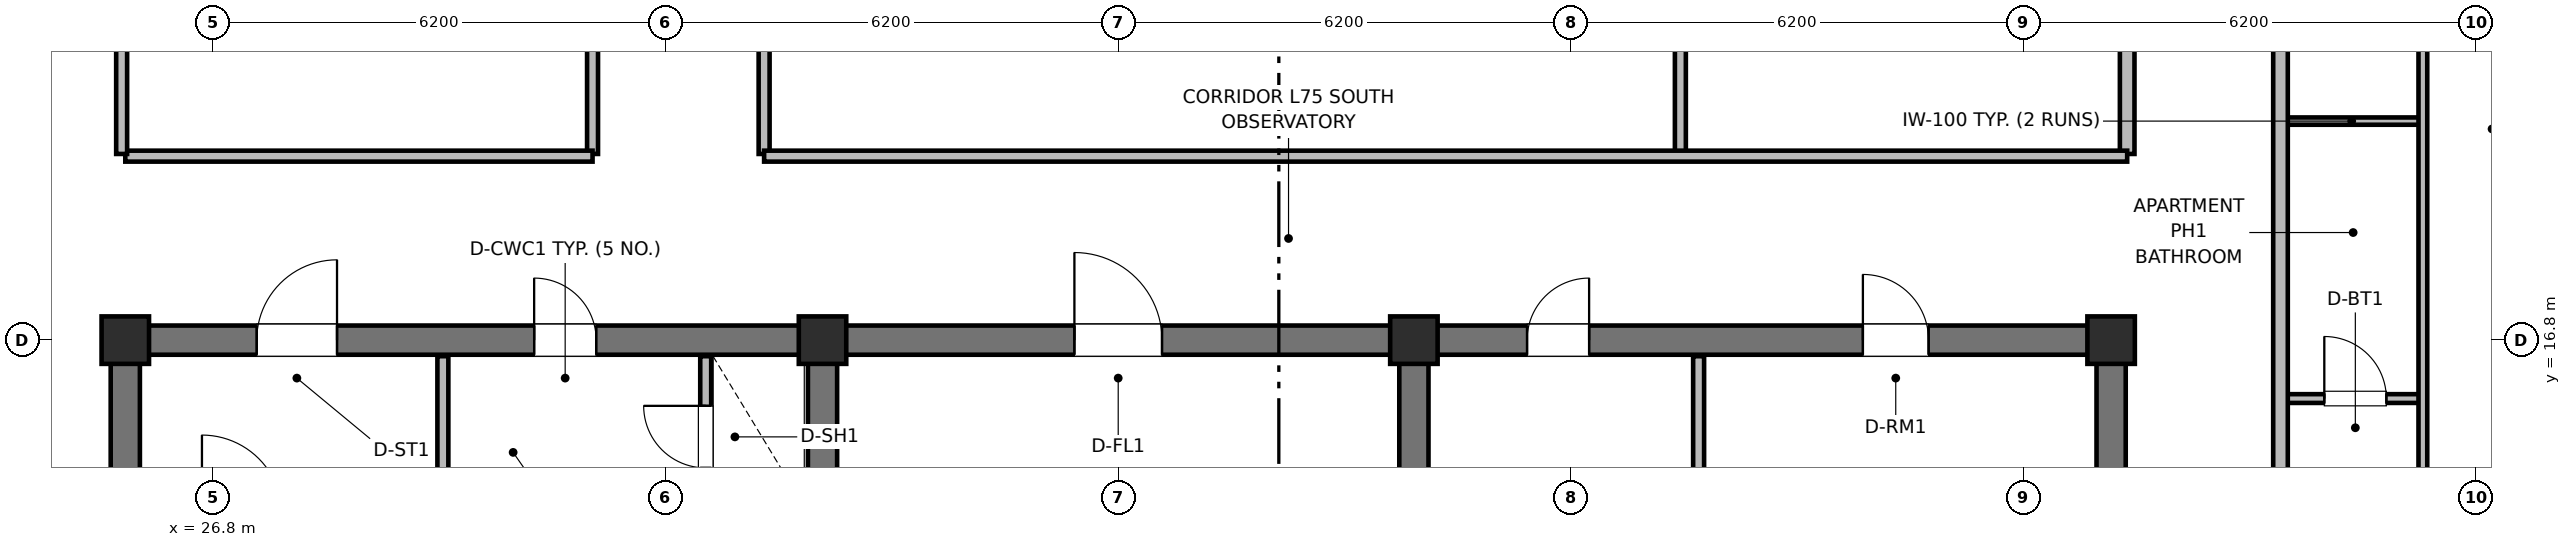
"""IFC4 building model, lengths in metres.
Left out: names, types, materials, properties, quantities, classifications, styles, units other than length and angle.
Written with IfcOpenShell. Run it as: python <this file> out.ifc"""

import sys

from ifc_helpers import new_model, si_unit, direction, frame, frame_2d, origin, origin_2d, place, context, subcontext, project, spatial, rectangle, extrude, element, fill, save


model = new_model("IFC4")
c1 = context("Model", 3, precision=1e-05, world=origin(), true_north=direction((0.0, 1.0)))
c2 = subcontext(c1, "Body", "Model", "MODEL_VIEW")
j1 = project(units=[si_unit("LENGTHUNIT", "METRE"), si_unit("PLANEANGLEUNIT", "RADIAN")], contexts=[c1])
p1 = place(None, origin())
s1 = spatial("IfcSite", under=j1, at=p1, CompositionType="ELEMENT")
p2 = place(p1, origin())
s2 = spatial("IfcBuilding", under=s1, at=p2, CompositionType="ELEMENT")
p3 = place(p2, frame((0.0, 0.0, 297.2)))
s3 = spatial("IfcBuildingStorey", under=s2, at=p3, CompositionType="ELEMENT", Elevation=297.2)
for number, where, z_axis, x_axis in (
    (1, (25.6, 10.8, 0.0), (0.0, 0.0, 1.0), (0.0, 1.0, 0.0)),
    (2, (52.8, 10.8, 0.0), (0.0, 0.0, 1.0), (0.0, 1.0, 0.0)),
):
    element("IfcWall", number, at=place(p3, frame(where, z_axis=z_axis, x_axis=x_axis)), inside=s3, PredefinedType="SHEAR", context=c2, shape_type="SweptSolid", body=[
        extrude(rectangle(XDim=5.8, YDim=0.4, at=frame_2d((2.9, 0.0))), origin(), (0.0, 0.0, 1.0), 4.8),
    ])
p4 = place(p3, frame((25.6, 16.8, 0.0), z_axis=(0.0, 0.0, 1.0), x_axis=(1.0, 0.0, 0.0)))
e3 = element("IfcWall", 3, at=p4, inside=s3, PredefinedType="SHEAR", context=c2, shape_type="SweptSolid", body=[
    extrude(rectangle(XDim=27.2, YDim=0.4, at=frame_2d((13.6, 0.0))), origin(), (0.0, 0.0, 1.0), 4.8),
])
p5 = place(p4, frame((1.8, 0.0, 0.0)))
e4 = element("IfcOpeningElement", 4, at=p5, cuts=e3, PredefinedType="OPENING", context=c2, shape_type="SweptSolid", body=[
    extrude(rectangle(XDim=1.1, YDim=2.15, at=frame_2d((0.55, 1.075))), frame((0.0, 0.21, 0.0), z_axis=(0.0, -1.0, 0.0), x_axis=(1.0, 0.0, 0.0)), (0.0, 0.0, 1.0), 0.42),
])
p6 = place(p4, frame((5.6, 0.0, 0.0)))
e5 = element("IfcOpeningElement", 5, at=p6, cuts=e3, PredefinedType="OPENING", context=c2, shape_type="SweptSolid", body=[
    extrude(rectangle(XDim=0.85, YDim=2.1, at=frame_2d((0.425, 1.05))), frame((0.0, 0.21, 0.0), z_axis=(0.0, -1.0, 0.0), x_axis=(1.0, 0.0, 0.0)), (0.0, 0.0, 1.0), 0.42),
])
p7 = place(p4, frame((13.0, 0.0, 0.0)))
e6 = element("IfcOpeningElement", 6, at=p7, cuts=e3, PredefinedType="OPENING", context=c2, shape_type="SweptSolid", body=[
    extrude(rectangle(XDim=1.2, YDim=2.15, at=frame_2d((0.6, 1.075))), frame((0.0, 0.21, 0.0), z_axis=(0.0, -1.0, 0.0), x_axis=(1.0, 0.0, 0.0)), (0.0, 0.0, 1.0), 0.42),
])
p8 = place(p4, frame((19.2, 0.0, 0.0)))
e7 = element("IfcOpeningElement", 7, at=p8, cuts=e3, PredefinedType="OPENING", context=c2, shape_type="SweptSolid", body=[
    extrude(rectangle(XDim=0.85, YDim=2.1, at=frame_2d((0.425, 1.05))), frame((0.0, 0.21, 0.0), z_axis=(0.0, -1.0, 0.0), x_axis=(1.0, 0.0, 0.0)), (0.0, 0.0, 1.0), 0.42),
])
p9 = place(p4, frame((23.8, 0.0, 0.0)))
e8 = element("IfcOpeningElement", 8, at=p9, cuts=e3, PredefinedType="OPENING", context=c2, shape_type="SweptSolid", body=[
    extrude(rectangle(XDim=0.9, YDim=2.1, at=frame_2d((0.45, 1.05))), frame((0.0, 0.21, 0.0), z_axis=(0.0, -1.0, 0.0), x_axis=(1.0, 0.0, 0.0)), (0.0, 0.0, 1.0), 0.42),
])
for number, where, z_axis, x_axis in (
    (9, (35.15, 10.8, 0.0), (0.0, 0.0, 1.0), (0.0, 1.0, 0.0)),
    (10, (43.25, 10.8, 0.0), (0.0, 0.0, 1.0), (0.0, 1.0, 0.0)),
):
    element("IfcWall", number, at=place(p3, frame(where, z_axis=z_axis, x_axis=x_axis)), inside=s3, PredefinedType="SHEAR", context=c2, shape_type="SweptSolid", body=[
        extrude(rectangle(XDim=5.8, YDim=0.4, at=frame_2d((2.9, 0.0))), origin(), (0.0, 0.0, 1.0), 4.8),
    ])
for number, where, z_axis, x_axis in (
    (11, (25.6, 16.8, 0.0), (0.0, 0.0, 1.0), (1.0, 0.0, 0.0)),
    (12, (35.15, 16.8, 0.0), (0.0, 0.0, 1.0), (1.0, 0.0, 0.0)),
    (13, (43.25, 16.8, 0.0), (0.0, 0.0, 1.0), (1.0, 0.0, 0.0)),
    (14, (52.8, 16.8, 0.0), (0.0, 0.0, 1.0), (1.0, 0.0, 0.0)),
):
    element("IfcColumn", number, at=place(p3, frame(where, z_axis=z_axis, x_axis=x_axis)), inside=s3, PredefinedType="COLUMN", context=c2, shape_type="SweptSolid", body=[
        extrude(rectangle(XDim=0.65, YDim=0.65, at=origin_2d()), origin(), (0.0, 0.0, 1.0), 4.8),
    ])
p10 = place(p3, frame((29.95, 14.5, 0.0), z_axis=(0.0, 0.0, 1.0), x_axis=(0.0, 1.0, 0.0)))
e15 = element("IfcWall", 15, at=p10, inside=s3, PredefinedType="PARTITIONING", context=c2, shape_type="SweptSolid", body=[
    extrude(rectangle(XDim=2.08, YDim=0.15, at=frame_2d((1.04, 0.0))), origin(), (0.0, 0.0, 1.0), 2.56),
])
p11 = place(p3, frame((33.55, 14.5, 0.0), z_axis=(0.0, 0.0, 1.0), x_axis=(0.0, 1.0, 0.0)))
e16 = element("IfcWall", 16, at=p11, inside=s3, PredefinedType="PARTITIONING", context=c2, shape_type="SweptSolid", body=[
    extrude(rectangle(XDim=2.08, YDim=0.15, at=frame_2d((1.04, 0.0))), origin(), (0.0, 0.0, 1.0), 2.56),
])
p12 = place(p11, frame((0.55, 0.0, 0.0)))
e17 = element("IfcOpeningElement", 17, at=p12, cuts=e16, PredefinedType="OPENING", context=c2, shape_type="SweptSolid", body=[
    extrude(rectangle(XDim=0.85, YDim=2.05, at=frame_2d((0.425, 1.025))), frame((0.0, 0.085, 0.0), z_axis=(0.0, -1.0, 0.0), x_axis=(1.0, 0.0, 0.0)), (0.0, 0.0, 1.0), 0.17),
])
p13 = place(p3, frame((47.15, 10.95, 0.0), z_axis=(0.0, 0.0, 1.0), x_axis=(0.0, 1.0, 0.0)))
e18 = element("IfcWall", 18, at=p13, inside=s3, PredefinedType="PARTITIONING", context=c2, shape_type="SweptSolid", body=[
    extrude(rectangle(XDim=5.63, YDim=0.15, at=frame_2d((2.815, 0.0))), origin(), (0.0, 0.0, 1.0), 2.56),
])
p14 = place(p3, frame((32.0, 19.35, 0.0), z_axis=(0.0, 0.0, 1.0), x_axis=(0.0, 1.0, 0.0)))
e19 = element("IfcWall", 19, at=p14, inside=s3, PredefinedType="PARTITIONING", context=c2, shape_type="SweptSolid", body=[
    extrude(rectangle(XDim=17.7, YDim=0.15, at=frame_2d((8.85, 0.0))), origin(), (0.0, 0.0, 1.0), 2.56),
])
p15 = place(p14, frame((3.0, 0.0, 0.0)))
e20 = element("IfcOpeningElement", 20, at=p15, cuts=e19, PredefinedType="OPENING", context=c2, shape_type="SweptSolid", body=[
    extrude(rectangle(XDim=1.3, YDim=2.2, at=frame_2d((0.65, 1.1))), frame((0.0, 0.085, 0.0), z_axis=(0.0, -1.0, 0.0), x_axis=(1.0, 0.0, 0.0)), (0.0, 0.0, 1.0), 0.17),
])
p16 = place(p14, frame((13.0, 0.0, 0.0)))
e21 = element("IfcOpeningElement", 21, at=p16, cuts=e19, PredefinedType="OPENING", context=c2, shape_type="SweptSolid", body=[
    extrude(rectangle(XDim=1.3, YDim=2.2, at=frame_2d((0.65, 1.1))), frame((0.0, 0.085, 0.0), z_axis=(0.0, -1.0, 0.0), x_axis=(1.0, 0.0, 0.0)), (0.0, 0.0, 1.0), 0.17),
])
p17 = place(p3, frame((25.6, 19.32, 0.0), z_axis=(0.0, 0.0, 1.0), x_axis=(1.0, 0.0, 0.0)))
e22 = element("IfcWall", 22, at=p17, inside=s3, PredefinedType="PARTITIONING", context=c2, shape_type="SweptSolid", body=[
    extrude(rectangle(XDim=6.4, YDim=0.15, at=frame_2d((3.2, 0.0))), origin(), (0.0, 0.0, 1.0), 2.56),
])
p18 = place(p3, frame((25.55, 19.35, 0.0), z_axis=(0.0, 0.0, 1.0), x_axis=(0.0, 1.0, 0.0)))
e23 = element("IfcWall", 23, at=p18, inside=s3, PredefinedType="PARTITIONING", context=c2, shape_type="SweptSolid", body=[
    extrude(rectangle(XDim=17.7, YDim=0.15, at=frame_2d((8.85, 0.0))), origin(), (0.0, 0.0, 1.0), 2.56),
])
p19 = place(p18, frame((5.5, 0.0, 0.0)))
e24 = element("IfcOpeningElement", 24, at=p19, cuts=e23, PredefinedType="OPENING", context=c2, shape_type="SweptSolid", body=[
    extrude(rectangle(XDim=1.3, YDim=2.2, at=frame_2d((0.65, 1.1))), frame((0.0, 0.085, 0.0), z_axis=(0.0, -1.0, 0.0), x_axis=(1.0, 0.0, 0.0)), (0.0, 0.0, 1.0), 0.17),
])
p20 = place(p3, frame((34.35, 19.35, 0.0), z_axis=(0.0, 0.0, 1.0), x_axis=(0.0, 1.0, 0.0)))
e25 = element("IfcWall", 25, at=p20, inside=s3, PredefinedType="PARTITIONING", context=c2, shape_type="SweptSolid", body=[
    extrude(rectangle(XDim=17.7, YDim=0.15, at=frame_2d((8.85, 0.0))), origin(), (0.0, 0.0, 1.0), 2.56),
])
p21 = place(p20, frame((4.0, 0.0, 0.0)))
e26 = element("IfcOpeningElement", 26, at=p21, cuts=e25, PredefinedType="OPENING", context=c2, shape_type="SweptSolid", body=[
    extrude(rectangle(XDim=1.3, YDim=2.2, at=frame_2d((0.65, 1.1))), frame((0.0, 0.085, 0.0), z_axis=(0.0, -1.0, 0.0), x_axis=(1.0, 0.0, 0.0)), (0.0, 0.0, 1.0), 0.17),
])
p22 = place(p20, frame((13.6, 0.0, 0.0)))
e27 = element("IfcOpeningElement", 27, at=p22, cuts=e25, PredefinedType="OPENING", context=c2, shape_type="SweptSolid", body=[
    extrude(rectangle(XDim=0.95, YDim=2.1, at=frame_2d((0.475, 1.05))), frame((0.0, 0.085, 0.0), z_axis=(0.0, -1.0, 0.0), x_axis=(1.0, 0.0, 0.0)), (0.0, 0.0, 1.0), 0.17),
])
p23 = place(p3, frame((46.9, 19.35, 0.0), z_axis=(0.0, 0.0, 1.0), x_axis=(0.0, 1.0, 0.0)))
e28 = element("IfcWall", 28, at=p23, inside=s3, PredefinedType="PARTITIONING", context=c2, shape_type="SweptSolid", body=[
    extrude(rectangle(XDim=17.7, YDim=0.15, at=frame_2d((8.85, 0.0))), origin(), (0.0, 0.0, 1.0), 2.56),
])
p24 = place(p3, frame((53.02, 19.35, 0.0), z_axis=(0.0, 0.0, 1.0), x_axis=(0.0, 1.0, 0.0)))
e29 = element("IfcWall", 29, at=p24, inside=s3, PredefinedType="PARTITIONING", context=c2, shape_type="SweptSolid", body=[
    extrude(rectangle(XDim=17.7, YDim=0.2, at=frame_2d((8.85, 0.0))), origin(), (0.0, 0.0, 1.0), 2.56),
])
p25 = place(p24, frame((6.5, 0.0, 0.0)))
e30 = element("IfcOpeningElement", 30, at=p25, cuts=e29, PredefinedType="OPENING", context=c2, shape_type="SweptSolid", body=[
    extrude(rectangle(XDim=1.0, YDim=2.15, at=frame_2d((0.5, 1.075))), frame((0.0, 0.11, 0.0), z_axis=(0.0, -1.0, 0.0), x_axis=(1.0, 0.0, 0.0)), (0.0, 0.0, 1.0), 0.22),
])
p26 = place(p3, frame((34.35, 19.32, 0.0), z_axis=(0.0, 0.0, 1.0), x_axis=(1.0, 0.0, 0.0)))
e31 = element("IfcWall", 31, at=p26, inside=s3, PredefinedType="PARTITIONING", context=c2, shape_type="SweptSolid", body=[
    extrude(rectangle(XDim=18.67, YDim=0.15, at=frame_2d((9.335, 0.0))), origin(), (0.0, 0.0, 1.0), 2.56),
])
p27 = place(p3, frame((55.12, 16.0, 0.0), z_axis=(0.0, 0.0, 1.0), x_axis=(1.0, 0.0, 0.0)))
e32 = element("IfcWall", 32, at=p27, inside=s3, PredefinedType="PARTITIONING", context=c2, shape_type="SweptSolid", body=[
    extrude(rectangle(XDim=1.95, YDim=0.12, at=frame_2d((0.975, 0.0))), origin(), (0.0, 0.0, 1.0), 2.56),
])
p28 = place(p27, frame((0.6, 0.0, 0.0)))
e33 = element("IfcOpeningElement", 33, at=p28, cuts=e32, PredefinedType="OPENING", context=c2, shape_type="SweptSolid", body=[
    extrude(rectangle(XDim=0.85, YDim=2.1, at=frame_2d((0.425, 1.05))), frame((0.0, 0.07, 0.0), z_axis=(0.0, -1.0, 0.0), x_axis=(1.0, 0.0, 0.0)), (0.0, 0.0, 1.0), 0.14),
])
p29 = place(p3, frame((55.12, 19.8, 0.0), z_axis=(0.0, 0.0, 1.0), x_axis=(1.0, 0.0, 0.0)))
e34 = element("IfcWall", 34, at=p29, inside=s3, PredefinedType="PARTITIONING", context=c2, shape_type="SweptSolid", body=[
    extrude(rectangle(XDim=1.95, YDim=0.1, at=frame_2d((0.975, 0.0))), origin(), (0.0, 0.0, 1.0), 2.56),
])
p30 = place(p3, frame((57.07, 10.64, 0.0), z_axis=(0.0, 0.0, 1.0), x_axis=(0.0, 1.0, 0.0)))
e35 = element("IfcWall", 35, at=p30, inside=s3, PredefinedType="PARTITIONING", context=c2, shape_type="SweptSolid", body=[
    extrude(rectangle(XDim=35.12, YDim=0.12, at=frame_2d((17.56, 0.0))), origin(), (0.0, 0.0, 1.0), 2.56),
])
p31 = place(p30, frame((1.36, 0.0, 0.0)))
e36 = element("IfcOpeningElement", 36, at=p31, cuts=e35, PredefinedType="OPENING", context=c2, shape_type="SweptSolid", body=[
    extrude(rectangle(XDim=0.9, YDim=2.1, at=frame_2d((0.45, 1.05))), frame((0.0, 0.07, 0.0), z_axis=(0.0, -1.0, 0.0), x_axis=(1.0, 0.0, 0.0)), (0.0, 0.0, 1.0), 0.14),
])
p32 = place(p30, frame((15.235, 0.0, 0.0)))
e37 = element("IfcOpeningElement", 37, at=p32, cuts=e35, PredefinedType="OPENING", context=c2, shape_type="SweptSolid", body=[
    extrude(rectangle(XDim=0.82, YDim=2.08, at=frame_2d((0.41, 1.04))), frame((0.0, 0.07, 0.0), z_axis=(0.0, -1.0, 0.0), x_axis=(1.0, 0.0, 0.0)), (0.0, 0.0, 1.0), 0.14),
])
p33 = place(p3, frame((55.12, 10.5, 0.0), z_axis=(0.0, 0.0, 1.0), x_axis=(0.0, 1.0, 0.0)))
e38 = element("IfcWall", 38, at=p33, inside=s3, PredefinedType="PARTITIONING", context=c2, shape_type="SweptSolid", body=[
    extrude(rectangle(XDim=35.4, YDim=0.2, at=frame_2d((17.7, 0.0))), origin(), (0.0, 0.0, 1.0), 2.56),
])
p34 = place(p33, frame((2.75, 0.0, 0.0)))
e39 = element("IfcOpeningElement", 39, at=p34, cuts=e38, PredefinedType="OPENING", context=c2, shape_type="SweptSolid", body=[
    extrude(rectangle(XDim=1.0, YDim=2.15, at=frame_2d((0.5, 1.075))), frame((0.0, 0.11, 0.0), z_axis=(0.0, -1.0, 0.0), x_axis=(1.0, 0.0, 0.0)), (0.0, 0.0, 1.0), 0.22),
])
p35 = place(p12, origin())
e40 = element("IfcDoor", 40, at=p35, inside=s3, OperationType="SINGLE_SWING_RIGHT", PredefinedType="TRAPDOOR", context=c2, shape_type="SweptSolid", body=[
    extrude(rectangle(XDim=0.85, YDim=2.05, at=frame_2d((0.425, 1.025))), frame((0.0, 0.025, 0.0), z_axis=(0.0, -1.0, 0.0), x_axis=(1.0, 0.0, 0.0)), (0.0, 0.0, 1.0), 0.05),
])
fill(e17, e40)
p36 = place(p28, origin())
e41 = element("IfcDoor", 41, at=p36, inside=s3, OperationType="SINGLE_SWING_LEFT", PredefinedType="DOOR", context=c2, shape_type="SweptSolid", body=[
    extrude(rectangle(XDim=0.85, YDim=2.1, at=frame_2d((0.425, 1.05))), frame((0.0, 0.025, 0.0), z_axis=(0.0, -1.0, 0.0), x_axis=(1.0, 0.0, 0.0)), (0.0, 0.0, 1.0), 0.05),
])
fill(e33, e41)
p37 = place(p5, origin())
e42 = element("IfcDoor", 42, at=p37, inside=s3, OperationType="SINGLE_SWING_RIGHT", PredefinedType="DOOR", context=c2, shape_type="SweptSolid", body=[
    extrude(rectangle(XDim=1.1, YDim=2.15, at=frame_2d((0.55, 1.075))), frame((0.0, 0.025, 0.0), z_axis=(0.0, -1.0, 0.0), x_axis=(1.0, 0.0, 0.0)), (0.0, 0.0, 1.0), 0.05),
])
fill(e4, e42)
p38 = place(p6, origin())
e43 = element("IfcDoor", 43, at=p38, inside=s3, OperationType="SINGLE_SWING_LEFT", PredefinedType="DOOR", context=c2, shape_type="SweptSolid", body=[
    extrude(rectangle(XDim=0.85, YDim=2.1, at=frame_2d((0.425, 1.05))), frame((0.0, 0.025, 0.0), z_axis=(0.0, -1.0, 0.0), x_axis=(1.0, 0.0, 0.0)), (0.0, 0.0, 1.0), 0.05),
])
fill(e5, e43)
p39 = place(p7, origin())
e44 = element("IfcDoor", 44, at=p39, inside=s3, OperationType="SINGLE_SWING_LEFT", PredefinedType="DOOR", context=c2, shape_type="SweptSolid", body=[
    extrude(rectangle(XDim=1.2, YDim=2.15, at=frame_2d((0.6, 1.075))), frame((0.0, 0.025, 0.0), z_axis=(0.0, -1.0, 0.0), x_axis=(1.0, 0.0, 0.0)), (0.0, 0.0, 1.0), 0.05),
])
fill(e6, e44)
p40 = place(p8, origin())
e45 = element("IfcDoor", 45, at=p40, inside=s3, OperationType="SINGLE_SWING_RIGHT", PredefinedType="DOOR", context=c2, shape_type="SweptSolid", body=[
    extrude(rectangle(XDim=0.85, YDim=2.1, at=frame_2d((0.425, 1.05))), frame((0.0, 0.025, 0.0), z_axis=(0.0, -1.0, 0.0), x_axis=(1.0, 0.0, 0.0)), (0.0, 0.0, 1.0), 0.05),
])
fill(e7, e45)
p41 = place(p9, origin())
e46 = element("IfcDoor", 46, at=p41, inside=s3, OperationType="SINGLE_SWING_LEFT", PredefinedType="DOOR", context=c2, shape_type="SweptSolid", body=[
    extrude(rectangle(XDim=0.9, YDim=2.1, at=frame_2d((0.45, 1.05))), frame((0.0, 0.025, 0.0), z_axis=(0.0, -1.0, 0.0), x_axis=(1.0, 0.0, 0.0)), (0.0, 0.0, 1.0), 0.05),
])
fill(e8, e46)
save(model, sys.argv[1])
